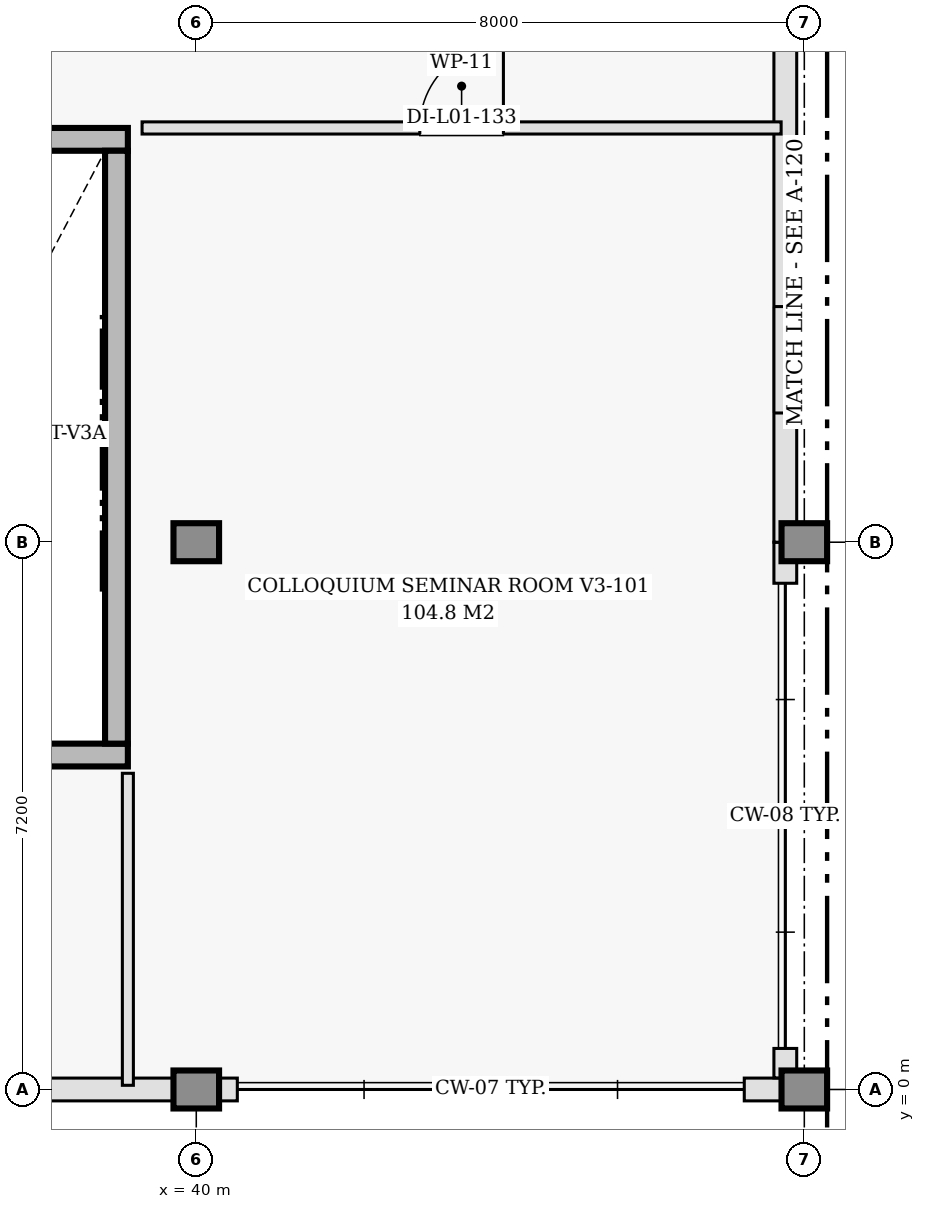
"""IFC4 building model, lengths in metres.
Left out: names, types, materials, properties, quantities, classifications, styles, units other than length and angle.
Written with IfcOpenShell. Run it as: python <this file> out.ifc"""

import sys

from ifc_helpers import new_model, si_unit, direction, frame, frame_2d, origin, origin_2d, place, context, subcontext, project, spatial, rectangle, extrude, element, fill, save


model = new_model("IFC4")
c1 = context("Model", 3, precision=1e-05, world=origin(), true_north=direction((0.0, 1.0)))
c2 = subcontext(c1, "Body", "Model", "MODEL_VIEW")
j1 = project(units=[si_unit("LENGTHUNIT", "METRE"), si_unit("PLANEANGLEUNIT", "RADIAN")], contexts=[c1])
p1 = place(None, origin())
s1 = spatial("IfcSite", under=j1, at=p1, CompositionType="ELEMENT")
p2 = place(p1, origin())
s2 = spatial("IfcBuilding", under=s1, at=p2, CompositionType="ELEMENT")
p3 = place(p2, frame((0.0, 0.0, 4.8)))
s3 = spatial("IfcBuildingStorey", under=s2, at=p3, CompositionType="ELEMENT", Elevation=4.8)
for number, where, z_axis, x_axis in (
    (1, (40.0, 0.0, 0.0), (0.0, 0.0, 1.0), (1.0, 0.0, 0.0)),
    (2, (40.0, 7.2, 0.0), (0.0, 0.0, 1.0), (1.0, 0.0, 0.0)),
    (3, (48.0, 0.0, 0.0), (0.0, 0.0, 1.0), (1.0, 0.0, 0.0)),
    (4, (48.0, 7.2, 0.0), (0.0, 0.0, 1.0), (1.0, 0.0, 0.0)),
):
    element("IfcColumn", number, at=place(p3, frame(where, z_axis=z_axis, x_axis=x_axis)), inside=s3, PredefinedType="COLUMN", context=c2, shape_type="SweptSolid", body=[
        extrude(rectangle(XDim=0.5, YDim=0.5, at=origin_2d()), origin(), (0.0, 0.0, 1.0), 4.8),
    ])
p4 = place(p3, frame((32.0, 0.0, 0.0), z_axis=(0.0, 0.0, 1.0), x_axis=(1.0, 0.0, 0.0)))
e5 = element("IfcWall", 5, at=p4, inside=s3, PredefinedType="SOLIDWALL", context=c2, shape_type="SweptSolid", body=[
    extrude(rectangle(XDim=8.0, YDim=0.3, at=frame_2d((4.0, 0.0))), origin(), (0.0, 0.0, 1.0), 3.865),
])
p5 = place(p4, frame((4.833, 0.0, 0.9)))
e6 = element("IfcOpeningElement", 6, at=p5, cuts=e5, PredefinedType="OPENING", context=c2, shape_type="SweptSolid", body=[
    extrude(rectangle(XDim=1.0, YDim=2.15, at=frame_2d((0.5, 1.075))), frame((0.0, 0.16, 0.0), z_axis=(0.0, -1.0, 0.0), x_axis=(1.0, 0.0, 0.0)), (0.0, 0.0, 1.0), 0.32),
])
for number, where, z_axis, x_axis in (
    (7, (40.0, 0.0, 0.0), (0.0, 0.0, 1.0), (1.0, 0.0, 0.0)),
    (8, (47.21, 0.0, 0.0), (0.0, 0.0, 1.0), (1.0, 0.0, 0.0)),
):
    element("IfcWall", number, at=place(p3, frame(where, z_axis=z_axis, x_axis=x_axis)), inside=s3, PredefinedType="SOLIDWALL", context=c2, shape_type="SweptSolid", body=[
        extrude(rectangle(XDim=0.54, YDim=0.3, at=frame_2d((0.27, 0.0))), origin(), (0.0, 0.0, 1.0), 3.865),
    ])
p6 = place(p3, frame((47.75, 0.152, 0.0), z_axis=(0.0, 0.0, 1.0), x_axis=(0.0, 1.0, 0.0)))
e9 = element("IfcWall", 9, at=p6, inside=s3, PredefinedType="SOLIDWALL", context=c2, shape_type="SweptSolid", body=[
    extrude(rectangle(XDim=0.388, YDim=0.3, at=frame_2d((0.194, 0.0))), origin(), (0.0, 0.0, 1.0), 3.865),
])
p7 = place(p3, frame((47.75, 6.66, 0.0), z_axis=(0.0, 0.0, 1.0), x_axis=(0.0, 1.0, 0.0)))
e10 = element("IfcWall", 10, at=p7, inside=s3, PredefinedType="SOLIDWALL", context=c2, shape_type="SweptSolid", body=[
    extrude(rectangle(XDim=0.54, YDim=0.3, at=frame_2d((0.27, 0.0))), origin(), (0.0, 0.0, 1.0), 3.865),
])
p8 = place(p3, frame((47.75, 7.2, 0.0), z_axis=(0.0, 0.0, 1.0), x_axis=(0.0, 1.0, 0.0)))
e11 = element("IfcWall", 11, at=p8, inside=s3, PredefinedType="SOLIDWALL", context=c2, shape_type="SweptSolid", body=[
    extrude(rectangle(XDim=7.2, YDim=0.3, at=frame_2d((3.6, 0.0))), origin(), (0.0, 0.0, 1.0), 3.865),
])
p9 = place(p8, frame((1.7, 0.0, 0.9)))
e12 = element("IfcOpeningElement", 12, at=p9, cuts=e11, PredefinedType="OPENING", context=c2, shape_type="SweptSolid", body=[
    extrude(rectangle(XDim=1.4, YDim=2.2, at=frame_2d((0.7, 1.1))), frame((0.0, 0.16, 0.0), z_axis=(0.0, -1.0, 0.0), x_axis=(1.0, 0.0, 0.0)), (0.0, 0.0, 1.0), 0.32),
])
for number, where, z_axis, x_axis in (
    (13, (34.4, 4.4, 0.0), (0.0, 0.0, 1.0), (1.0, 0.0, 0.0)),
    (14, (34.4, 12.5, 0.0), (0.0, 0.0, 1.0), (1.0, 0.0, 0.0)),
):
    element("IfcWall", number, at=place(p3, frame(where, z_axis=z_axis, x_axis=x_axis)), inside=s3, PredefinedType="SHEAR", context=c2, shape_type="SweptSolid", body=[
        extrude(rectangle(XDim=4.7, YDim=0.3, at=frame_2d((2.35, 0.0))), origin(), (0.0, 0.0, 1.0), 4.48),
    ])
p10 = place(p3, frame((38.95, 4.55, 0.0), z_axis=(0.0, 0.0, 1.0), x_axis=(0.0, 1.0, 0.0)))
e15 = element("IfcWall", 15, at=p10, inside=s3, PredefinedType="SHEAR", context=c2, shape_type="SweptSolid", body=[
    extrude(rectangle(XDim=7.8, YDim=0.3, at=frame_2d((3.9, 0.0))), origin(), (0.0, 0.0, 1.0), 4.48),
])
p11 = place(p3, frame((39.287, 12.65, 0.0), z_axis=(0.0, 0.0, 1.0), x_axis=(1.0, 0.0, 0.0)))
e16 = element("IfcWall", 16, at=p11, inside=s3, PredefinedType="PARTITIONING", context=c2, shape_type="SweptSolid", body=[
    extrude(rectangle(XDim=8.408, YDim=0.16, at=frame_2d((4.204, 0.0))), origin(), (0.0, 0.0, 1.0), 3.915),
])
p12 = place(p11, frame((3.654, 0.0, 0.0)))
e17 = element("IfcOpeningElement", 17, at=p12, cuts=e16, PredefinedType="OPENING", context=c2, shape_type="SweptSolid", body=[
    extrude(rectangle(XDim=1.1, YDim=2.15, at=frame_2d((0.55, 1.075))), frame((0.0, 0.09, 0.0), z_axis=(0.0, -1.0, 0.0), x_axis=(1.0, 0.0, 0.0)), (0.0, 0.0, 1.0), 0.18),
])
p13 = place(p3, frame((39.1, 0.055, 0.0), z_axis=(0.0, 0.0, 1.0), x_axis=(0.0, 1.0, 0.0)))
e18 = element("IfcWall", 18, at=p13, inside=s3, PredefinedType="PARTITIONING", context=c2, shape_type="SweptSolid", body=[
    extrude(rectangle(XDim=4.105, YDim=0.145, at=frame_2d((2.052, 0.0))), origin(), (0.0, 0.0, 1.0), 3.865),
])
p14 = place(p9, origin())
e19 = element("IfcWindow", 19, at=p14, inside=s3, PartitioningType="DOUBLE_PANEL_VERTICAL", PredefinedType="WINDOW", context=c2, shape_type="SweptSolid", body=[
    extrude(rectangle(XDim=1.4, YDim=2.2, at=frame_2d((0.7, 1.1))), frame((0.0, 0.03, 0.0), z_axis=(0.0, -1.0, 0.0), x_axis=(1.0, 0.0, 0.0)), (0.0, 0.0, 1.0), 0.06),
])
fill(e12, e19)
p15 = place(p12, origin())
e20 = element("IfcDoor", 20, at=p15, inside=s3, OperationType="SINGLE_SWING_RIGHT", PredefinedType="DOOR", context=c2, shape_type="SweptSolid", body=[
    extrude(rectangle(XDim=1.1, YDim=2.15, at=frame_2d((0.55, 1.075))), frame((0.0, 0.025, 0.0), z_axis=(0.0, -1.0, 0.0), x_axis=(1.0, 0.0, 0.0)), (0.0, 0.0, 1.0), 0.05),
])
fill(e17, e20)
save(model, sys.argv[1])
